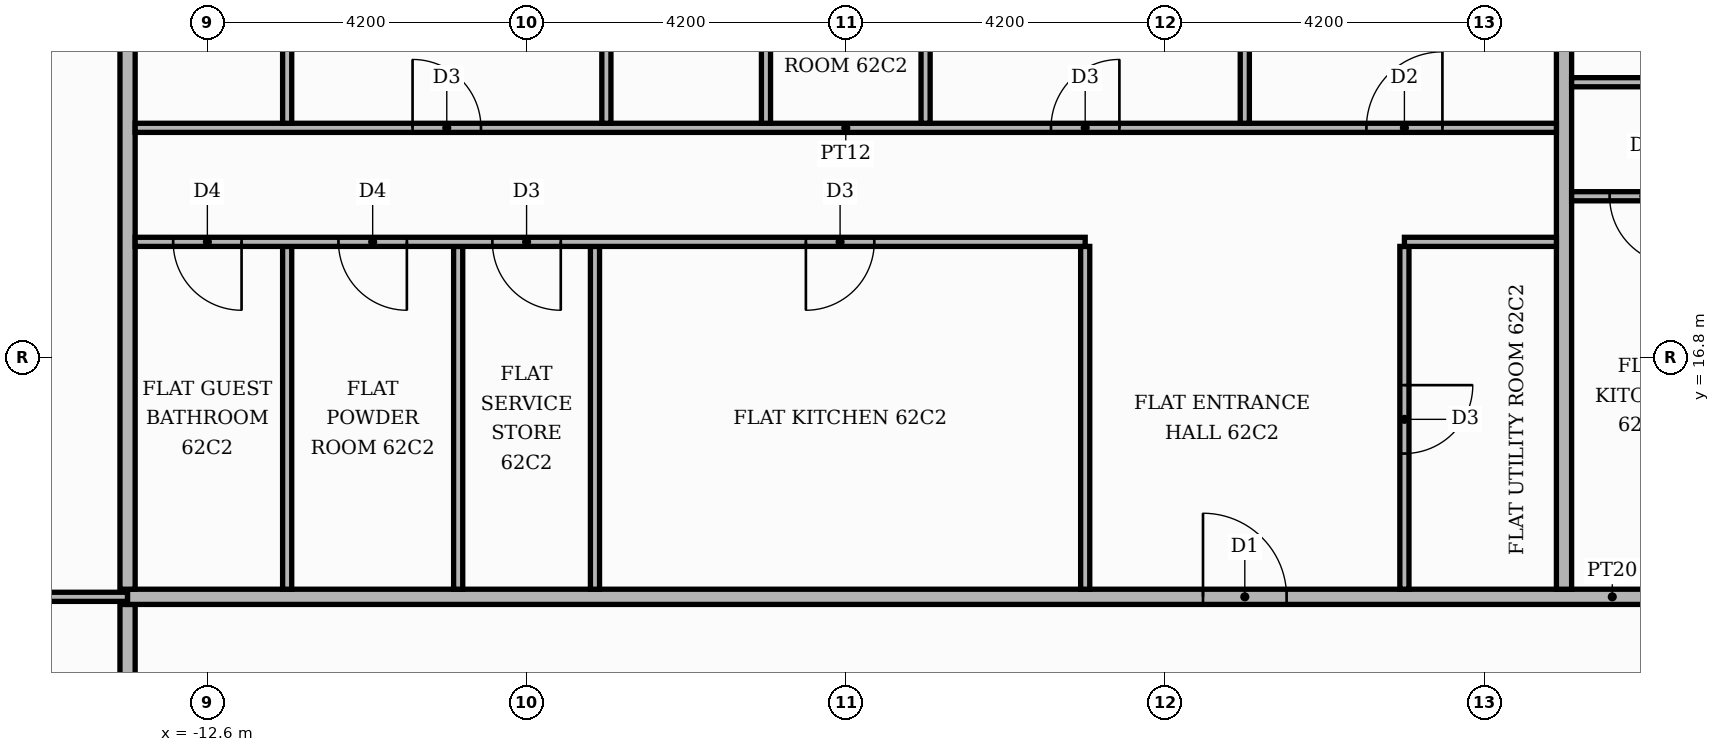
"""IFC4 building model, lengths in metres.
Left out: names, types, materials, properties, quantities, classifications, styles, units other than length and angle.
Written with IfcOpenShell. Run it as: python <this file> out.ifc"""

import sys

from ifc_helpers import new_model, si_unit, direction, frame, frame_2d, origin, place, context, subcontext, project, spatial, rectangle, extrude, element, fill, save


model = new_model("IFC4")
c1 = context("Model", 3, precision=1e-05, world=origin(), true_north=direction((0.0, 1.0)))
c2 = subcontext(c1, "Body", "Model", "MODEL_VIEW")
j1 = project(units=[si_unit("LENGTHUNIT", "METRE"), si_unit("PLANEANGLEUNIT", "RADIAN")], contexts=[c1])
p1 = place(None, origin())
s1 = spatial("IfcSite", under=j1, at=p1, CompositionType="ELEMENT")
p2 = place(p1, origin())
s2 = spatial("IfcBuilding", under=s1, at=p2, CompositionType="ELEMENT")
p3 = place(p2, frame((0.0, 0.0, 260.1)))
s3 = spatial("IfcBuildingStorey", under=s2, at=p3, CompositionType="ELEMENT", Elevation=260.1)
p4 = place(p3, frame((-13.65, 11.1, 0.0), z_axis=(0.0, 0.0, 1.0), x_axis=(0.0, 1.0, 0.0)))
e1 = element("IfcWall", 1, at=p4, inside=s3, PredefinedType="PARTITIONING", context=c2, shape_type="SweptSolid", body=[
    extrude(rectangle(XDim=2.45, YDim=0.2, at=frame_2d((1.225, 0.0))), origin(), (0.0, 0.0, 1.0), 3.48),
])
p5 = place(p3, frame((-20.72, 13.65, 0.0), z_axis=(0.0, 0.0, 1.0), x_axis=(1.0, 0.0, 0.0)))
e2 = element("IfcWall", 2, at=p5, inside=s3, PredefinedType="PARTITIONING", context=c2, shape_type="SweptSolid", body=[
    extrude(rectangle(XDim=7.07, YDim=0.12, at=frame_2d((3.535, 0.0))), origin(), (0.0, 0.0, 1.0), 3.48),
])
p6 = place(p5, frame((3.085, 0.0, 0.0)))
e3 = element("IfcOpeningElement", 3, at=p6, cuts=e2, PredefinedType="OPENING", context=c2, shape_type="SweptSolid", body=[
    extrude(rectangle(XDim=0.9, YDim=2.1, at=frame_2d((0.45, 1.05))), frame((0.0, 0.07, 0.0), z_axis=(0.0, -1.0, 0.0), x_axis=(1.0, 0.0, 0.0)), (0.0, 0.0, 1.0), 0.14),
])
p7 = place(p3, frame((-13.65, 13.65, 0.0), z_axis=(0.0, 0.0, 1.0), x_axis=(1.0, 0.0, 0.0)))
e4 = element("IfcWall", 4, at=p7, inside=s3, PredefinedType="PARTITIONING", context=c2, shape_type="SweptSolid", body=[
    extrude(rectangle(XDim=39.07, YDim=0.2, at=frame_2d((19.535, 0.0))), origin(), (0.0, 0.0, 1.0), 3.48),
])
p8 = place(p7, frame((24.65, 0.0, 0.0)))
e5 = element("IfcOpeningElement", 5, at=p8, cuts=e4, PredefinedType="OPENING", context=c2, shape_type="SweptSolid", body=[
    extrude(rectangle(XDim=1.1, YDim=2.4, at=frame_2d((0.55, 1.2))), frame((0.0, 0.11, 0.0), z_axis=(0.0, -1.0, 0.0), x_axis=(1.0, 0.0, 0.0)), (0.0, 0.0, 1.0), 0.22),
])
p9 = place(p7, frame((14.15, 0.0, 0.0)))
e6 = element("IfcOpeningElement", 6, at=p9, cuts=e4, PredefinedType="OPENING", context=c2, shape_type="SweptSolid", body=[
    extrude(rectangle(XDim=1.1, YDim=2.4, at=frame_2d((0.55, 1.2))), frame((0.0, 0.11, 0.0), z_axis=(0.0, -1.0, 0.0), x_axis=(1.0, 0.0, 0.0)), (0.0, 0.0, 1.0), 0.22),
])
p10 = place(p3, frame((-13.65, 13.75, 0.0), z_axis=(0.0, 0.0, 1.0), x_axis=(0.0, 1.0, 0.0)))
e7 = element("IfcWall", 7, at=p10, inside=s3, PredefinedType="PARTITIONING", context=c2, shape_type="SweptSolid", body=[
    extrude(rectangle(XDim=11.67, YDim=0.2, at=frame_2d((5.835, 0.0))), origin(), (0.0, 0.0, 1.0), 3.48),
])
for number, where, z_axis, x_axis in (
    (8, (-11.55, 13.75, 0.0), (0.0, 0.0, 1.0), (0.0, 1.0, 0.0)),
    (9, (-9.3, 13.75, 0.0), (0.0, 0.0, 1.0), (0.0, 1.0, 0.0)),
    (10, (-7.5, 13.75, 0.0), (0.0, 0.0, 1.0), (0.0, 1.0, 0.0)),
    (11, (-1.05, 13.75, 0.0), (0.0, 0.0, 1.0), (0.0, 1.0, 0.0)),
):
    element("IfcWall", number, at=place(p3, frame(where, z_axis=z_axis, x_axis=x_axis)), inside=s3, PredefinedType="PARTITIONING", context=c2, shape_type="SweptSolid", body=[
        extrude(rectangle(XDim=4.51, YDim=0.12, at=frame_2d((2.255, 0.0))), origin(), (0.0, 0.0, 1.0), 3.48),
    ])
p11 = place(p3, frame((3.15, 13.75, 0.0), z_axis=(0.0, 0.0, 1.0), x_axis=(0.0, 1.0, 0.0)))
e12 = element("IfcWall", 12, at=p11, inside=s3, PredefinedType="PARTITIONING", context=c2, shape_type="SweptSolid", body=[
    extrude(rectangle(XDim=4.51, YDim=0.12, at=frame_2d((2.255, 0.0))), origin(), (0.0, 0.0, 1.0), 3.48),
])
p12 = place(p11, frame((1.785, 0.0, 0.0)))
e13 = element("IfcOpeningElement", 13, at=p12, cuts=e12, PredefinedType="OPENING", context=c2, shape_type="SweptSolid", body=[
    extrude(rectangle(XDim=0.9, YDim=2.1, at=frame_2d((0.45, 1.05))), frame((0.0, 0.07, 0.0), z_axis=(0.0, -1.0, 0.0), x_axis=(1.0, 0.0, 0.0)), (0.0, 0.0, 1.0), 0.14),
])
p13 = place(p3, frame((5.25, 13.75, 0.0), z_axis=(0.0, 0.0, 1.0), x_axis=(0.0, 1.0, 0.0)))
e14 = element("IfcWall", 14, at=p13, inside=s3, PredefinedType="PARTITIONING", context=c2, shape_type="SweptSolid", body=[
    extrude(rectangle(XDim=11.67, YDim=0.2, at=frame_2d((5.835, 0.0))), origin(), (0.0, 0.0, 1.0), 3.48),
])
p14 = place(p3, frame((-13.55, 18.32, 0.0), z_axis=(0.0, 0.0, 1.0), x_axis=(1.0, 0.0, 0.0)))
e15 = element("IfcWall", 15, at=p14, inside=s3, PredefinedType="PARTITIONING", context=c2, shape_type="SweptSolid", body=[
    extrude(rectangle(XDim=12.5, YDim=0.12, at=frame_2d((6.25, 0.0))), origin(), (0.0, 0.0, 1.0), 3.48),
])
p15 = place(p14, frame((8.825, 0.0, 0.0)))
e16 = element("IfcOpeningElement", 16, at=p15, cuts=e15, PredefinedType="OPENING", context=c2, shape_type="SweptSolid", body=[
    extrude(rectangle(XDim=0.9, YDim=2.1, at=frame_2d((0.45, 1.05))), frame((0.0, 0.07, 0.0), z_axis=(0.0, -1.0, 0.0), x_axis=(1.0, 0.0, 0.0)), (0.0, 0.0, 1.0), 0.14),
])
p16 = place(p14, frame((4.7, 0.0, 0.0)))
e17 = element("IfcOpeningElement", 17, at=p16, cuts=e15, PredefinedType="OPENING", context=c2, shape_type="SweptSolid", body=[
    extrude(rectangle(XDim=0.9, YDim=2.1, at=frame_2d((0.45, 1.05))), frame((0.0, 0.07, 0.0), z_axis=(0.0, -1.0, 0.0), x_axis=(1.0, 0.0, 0.0)), (0.0, 0.0, 1.0), 0.14),
])
p17 = place(p14, frame((2.675, 0.0, 0.0)))
e18 = element("IfcOpeningElement", 18, at=p17, cuts=e15, PredefinedType="OPENING", context=c2, shape_type="SweptSolid", body=[
    extrude(rectangle(XDim=0.9, YDim=2.1, at=frame_2d((0.45, 1.05))), frame((0.0, 0.07, 0.0), z_axis=(0.0, -1.0, 0.0), x_axis=(1.0, 0.0, 0.0)), (0.0, 0.0, 1.0), 0.14),
])
p18 = place(p14, frame((0.5, 0.0, 0.0)))
e19 = element("IfcOpeningElement", 19, at=p18, cuts=e15, PredefinedType="OPENING", context=c2, shape_type="SweptSolid", body=[
    extrude(rectangle(XDim=0.9, YDim=2.1, at=frame_2d((0.45, 1.05))), frame((0.0, 0.07, 0.0), z_axis=(0.0, -1.0, 0.0), x_axis=(1.0, 0.0, 0.0)), (0.0, 0.0, 1.0), 0.14),
])
p19 = place(p3, frame((3.15, 18.32, 0.0), z_axis=(0.0, 0.0, 1.0), x_axis=(1.0, 0.0, 0.0)))
e20 = element("IfcWall", 20, at=p19, inside=s3, PredefinedType="PARTITIONING", context=c2, shape_type="SweptSolid", body=[
    extrude(rectangle(XDim=2.0, YDim=0.12, at=frame_2d((1.0, 0.0))), origin(), (0.0, 0.0, 1.0), 3.48),
])
p20 = place(p3, frame((5.35, 18.92, 0.0), z_axis=(0.0, 0.0, 1.0), x_axis=(1.0, 0.0, 0.0)))
e21 = element("IfcWall", 21, at=p20, inside=s3, PredefinedType="PARTITIONING", context=c2, shape_type="SweptSolid", body=[
    extrude(rectangle(XDim=4.1, YDim=0.12, at=frame_2d((2.05, 0.0))), origin(), (0.0, 0.0, 1.0), 3.48),
])
p21 = place(p20, frame((0.5, 0.0, 0.0)))
e22 = element("IfcOpeningElement", 22, at=p21, cuts=e21, PredefinedType="OPENING", context=c2, shape_type="SweptSolid", body=[
    extrude(rectangle(XDim=0.9, YDim=2.1, at=frame_2d((0.45, 1.05))), frame((0.0, 0.07, 0.0), z_axis=(0.0, -1.0, 0.0), x_axis=(1.0, 0.0, 0.0)), (0.0, 0.0, 1.0), 0.14),
])
p22 = place(p3, frame((-13.55, 19.82, 0.0), z_axis=(0.0, 0.0, 1.0), x_axis=(1.0, 0.0, 0.0)))
e23 = element("IfcWall", 23, at=p22, inside=s3, PredefinedType="PARTITIONING", context=c2, shape_type="SweptSolid", body=[
    extrude(rectangle(XDim=18.7, YDim=0.12, at=frame_2d((9.35, 0.0))), origin(), (0.0, 0.0, 1.0), 3.48),
])
p23 = place(p22, frame((16.2, 0.0, 0.0)))
e24 = element("IfcOpeningElement", 24, at=p23, cuts=e23, PredefinedType="OPENING", context=c2, shape_type="SweptSolid", body=[
    extrude(rectangle(XDim=1.0, YDim=2.1, at=frame_2d((0.5, 1.05))), frame((0.0, 0.07, 0.0), z_axis=(0.0, -1.0, 0.0), x_axis=(1.0, 0.0, 0.0)), (0.0, 0.0, 1.0), 0.14),
])
p24 = place(p22, frame((12.05, 0.0, 0.0)))
e25 = element("IfcOpeningElement", 25, at=p24, cuts=e23, PredefinedType="OPENING", context=c2, shape_type="SweptSolid", body=[
    extrude(rectangle(XDim=0.9, YDim=2.1, at=frame_2d((0.45, 1.05))), frame((0.0, 0.07, 0.0), z_axis=(0.0, -1.0, 0.0), x_axis=(1.0, 0.0, 0.0)), (0.0, 0.0, 1.0), 0.14),
])
p25 = place(p22, frame((3.65, 0.0, 0.0)))
e26 = element("IfcOpeningElement", 26, at=p25, cuts=e23, PredefinedType="OPENING", context=c2, shape_type="SweptSolid", body=[
    extrude(rectangle(XDim=0.9, YDim=2.1, at=frame_2d((0.45, 1.05))), frame((0.0, 0.07, 0.0), z_axis=(0.0, -1.0, 0.0), x_axis=(1.0, 0.0, 0.0)), (0.0, 0.0, 1.0), 0.14),
])
p26 = place(p3, frame((-11.55, 19.88, 0.0), z_axis=(0.0, 0.0, 1.0), x_axis=(0.0, 1.0, 0.0)))
e27 = element("IfcWall", 27, at=p26, inside=s3, PredefinedType="PARTITIONING", context=c2, shape_type="SweptSolid", body=[
    extrude(rectangle(XDim=5.54, YDim=0.12, at=frame_2d((2.77, 0.0))), origin(), (0.0, 0.0, 1.0), 3.48),
])
p27 = place(p26, frame((2.44, 0.0, 0.0)))
e28 = element("IfcOpeningElement", 28, at=p27, cuts=e27, PredefinedType="OPENING", context=c2, shape_type="SweptSolid", body=[
    extrude(rectangle(XDim=0.9, YDim=2.1, at=frame_2d((0.45, 1.05))), frame((0.0, 0.07, 0.0), z_axis=(0.0, -1.0, 0.0), x_axis=(1.0, 0.0, 0.0)), (0.0, 0.0, 1.0), 0.14),
])
p28 = place(p3, frame((-7.35, 19.88, 0.0), z_axis=(0.0, 0.0, 1.0), x_axis=(0.0, 1.0, 0.0)))
e29 = element("IfcWall", 29, at=p28, inside=s3, PredefinedType="PARTITIONING", context=c2, shape_type="SweptSolid", body=[
    extrude(rectangle(XDim=5.54, YDim=0.12, at=frame_2d((2.77, 0.0))), origin(), (0.0, 0.0, 1.0), 3.48),
])
p29 = place(p3, frame((-5.25, 19.88, 0.0), z_axis=(0.0, 0.0, 1.0), x_axis=(0.0, 1.0, 0.0)))
e30 = element("IfcWall", 30, at=p29, inside=s3, PredefinedType="PARTITIONING", context=c2, shape_type="SweptSolid", body=[
    extrude(rectangle(XDim=5.54, YDim=0.12, at=frame_2d((2.77, 0.0))), origin(), (0.0, 0.0, 1.0), 3.48),
])
p30 = place(p29, frame((2.44, 0.0, 0.0)))
e31 = element("IfcOpeningElement", 31, at=p30, cuts=e30, PredefinedType="OPENING", context=c2, shape_type="SweptSolid", body=[
    extrude(rectangle(XDim=0.9, YDim=2.1, at=frame_2d((0.45, 1.05))), frame((0.0, 0.07, 0.0), z_axis=(0.0, -1.0, 0.0), x_axis=(1.0, 0.0, 0.0)), (0.0, 0.0, 1.0), 0.14),
])
p31 = place(p3, frame((-3.15, 19.88, 0.0), z_axis=(0.0, 0.0, 1.0), x_axis=(0.0, 1.0, 0.0)))
e32 = element("IfcWall", 32, at=p31, inside=s3, PredefinedType="PARTITIONING", context=c2, shape_type="SweptSolid", body=[
    extrude(rectangle(XDim=5.54, YDim=0.12, at=frame_2d((2.77, 0.0))), origin(), (0.0, 0.0, 1.0), 3.48),
])
p32 = place(p31, frame((2.44, 0.0, 0.0)))
e33 = element("IfcOpeningElement", 33, at=p32, cuts=e32, PredefinedType="OPENING", context=c2, shape_type="SweptSolid", body=[
    extrude(rectangle(XDim=0.9, YDim=2.1, at=frame_2d((0.45, 1.05))), frame((0.0, 0.07, 0.0), z_axis=(0.0, -1.0, 0.0), x_axis=(1.0, 0.0, 0.0)), (0.0, 0.0, 1.0), 0.14),
])
p33 = place(p3, frame((1.05, 19.88, 0.0), z_axis=(0.0, 0.0, 1.0), x_axis=(0.0, 1.0, 0.0)))
e34 = element("IfcWall", 34, at=p33, inside=s3, PredefinedType="PARTITIONING", context=c2, shape_type="SweptSolid", body=[
    extrude(rectangle(XDim=5.54, YDim=0.12, at=frame_2d((2.77, 0.0))), origin(), (0.0, 0.0, 1.0), 3.48),
])
p34 = place(p3, frame((5.35, 20.42, 0.0), z_axis=(0.0, 0.0, 1.0), x_axis=(1.0, 0.0, 0.0)))
e35 = element("IfcWall", 35, at=p34, inside=s3, PredefinedType="PARTITIONING", context=c2, shape_type="SweptSolid", body=[
    extrude(rectangle(XDim=15.369, YDim=0.12, at=frame_2d((7.685, 0.0))), origin(), (0.0, 0.0, 1.0), 3.48),
])
p35 = place(p34, frame((8.85, 0.0, 0.0)))
e36 = element("IfcOpeningElement", 36, at=p35, cuts=e35, PredefinedType="OPENING", context=c2, shape_type="SweptSolid", body=[
    extrude(rectangle(XDim=1.0, YDim=2.1, at=frame_2d((0.5, 1.05))), frame((0.0, 0.07, 0.0), z_axis=(0.0, -1.0, 0.0), x_axis=(1.0, 0.0, 0.0)), (0.0, 0.0, 1.0), 0.14),
])
p36 = place(p34, frame((5.75, 0.0, 0.0)))
e37 = element("IfcOpeningElement", 37, at=p36, cuts=e35, PredefinedType="OPENING", context=c2, shape_type="SweptSolid", body=[
    extrude(rectangle(XDim=0.9, YDim=2.1, at=frame_2d((0.45, 1.05))), frame((0.0, 0.07, 0.0), z_axis=(0.0, -1.0, 0.0), x_axis=(1.0, 0.0, 0.0)), (0.0, 0.0, 1.0), 0.14),
])
p37 = place(p21, frame((0.9, 0.0, 0.0), z_axis=(0.0, 0.0, 1.0), x_axis=(-1.0, 0.0, 0.0)))
e38 = element("IfcDoor", 38, at=p37, inside=s3, OperationType="SINGLE_SWING_RIGHT", PredefinedType="DOOR", context=c2, shape_type="SweptSolid", body=[
    extrude(rectangle(XDim=0.9, YDim=2.1, at=frame_2d((0.45, 1.05))), frame((0.0, 0.025, 0.0), z_axis=(0.0, -1.0, 0.0), x_axis=(1.0, 0.0, 0.0)), (0.0, 0.0, 1.0), 0.05),
])
fill(e22, e38)
p38 = place(p9, origin())
e39 = element("IfcDoor", 39, at=p38, inside=s3, OperationType="SINGLE_SWING_LEFT", PredefinedType="DOOR", context=c2, shape_type="SweptSolid", body=[
    extrude(rectangle(XDim=1.1, YDim=2.4, at=frame_2d((0.55, 1.2))), frame((0.0, 0.025, 0.0), z_axis=(0.0, -1.0, 0.0), x_axis=(1.0, 0.0, 0.0)), (0.0, 0.0, 1.0), 0.05),
])
fill(e6, e39)
p39 = place(p12, frame((0.9, 0.0, 0.0), z_axis=(0.0, 0.0, 1.0), x_axis=(-1.0, 0.0, 0.0)))
e40 = element("IfcDoor", 40, at=p39, inside=s3, OperationType="SINGLE_SWING_RIGHT", PredefinedType="DOOR", context=c2, shape_type="SweptSolid", body=[
    extrude(rectangle(XDim=0.9, YDim=2.1, at=frame_2d((0.45, 1.05))), frame((0.0, 0.025, 0.0), z_axis=(0.0, -1.0, 0.0), x_axis=(1.0, 0.0, 0.0)), (0.0, 0.0, 1.0), 0.05),
])
fill(e13, e40)
p40 = place(p15, frame((0.9, 0.0, 0.0), z_axis=(0.0, 0.0, 1.0), x_axis=(-1.0, 0.0, 0.0)))
e41 = element("IfcDoor", 41, at=p40, inside=s3, OperationType="SINGLE_SWING_LEFT", PredefinedType="DOOR", context=c2, shape_type="SweptSolid", body=[
    extrude(rectangle(XDim=0.9, YDim=2.1, at=frame_2d((0.45, 1.05))), frame((0.0, 0.025, 0.0), z_axis=(0.0, -1.0, 0.0), x_axis=(1.0, 0.0, 0.0)), (0.0, 0.0, 1.0), 0.05),
])
fill(e16, e41)
p41 = place(p16, frame((0.9, 0.0, 0.0), z_axis=(0.0, 0.0, 1.0), x_axis=(-1.0, 0.0, 0.0)))
e42 = element("IfcDoor", 42, at=p41, inside=s3, OperationType="SINGLE_SWING_RIGHT", PredefinedType="DOOR", context=c2, shape_type="SweptSolid", body=[
    extrude(rectangle(XDim=0.9, YDim=2.1, at=frame_2d((0.45, 1.05))), frame((0.0, 0.025, 0.0), z_axis=(0.0, -1.0, 0.0), x_axis=(1.0, 0.0, 0.0)), (0.0, 0.0, 1.0), 0.05),
])
fill(e17, e42)
p42 = place(p17, frame((0.9, 0.0, 0.0), z_axis=(0.0, 0.0, 1.0), x_axis=(-1.0, 0.0, 0.0)))
e43 = element("IfcDoor", 43, at=p42, inside=s3, OperationType="SINGLE_SWING_RIGHT", PredefinedType="DOOR", context=c2, shape_type="SweptSolid", body=[
    extrude(rectangle(XDim=0.9, YDim=2.1, at=frame_2d((0.45, 1.05))), frame((0.0, 0.025, 0.0), z_axis=(0.0, -1.0, 0.0), x_axis=(1.0, 0.0, 0.0)), (0.0, 0.0, 1.0), 0.05),
])
fill(e18, e43)
p43 = place(p18, frame((0.9, 0.0, 0.0), z_axis=(0.0, 0.0, 1.0), x_axis=(-1.0, 0.0, 0.0)))
e44 = element("IfcDoor", 44, at=p43, inside=s3, OperationType="SINGLE_SWING_RIGHT", PredefinedType="DOOR", context=c2, shape_type="SweptSolid", body=[
    extrude(rectangle(XDim=0.9, YDim=2.1, at=frame_2d((0.45, 1.05))), frame((0.0, 0.025, 0.0), z_axis=(0.0, -1.0, 0.0), x_axis=(1.0, 0.0, 0.0)), (0.0, 0.0, 1.0), 0.05),
])
fill(e19, e44)
p44 = place(p23, origin())
e45 = element("IfcDoor", 45, at=p44, inside=s3, OperationType="SINGLE_SWING_RIGHT", PredefinedType="DOOR", context=c2, shape_type="SweptSolid", body=[
    extrude(rectangle(XDim=1.0, YDim=2.1, at=frame_2d((0.5, 1.05))), frame((0.0, 0.025, 0.0), z_axis=(0.0, -1.0, 0.0), x_axis=(1.0, 0.0, 0.0)), (0.0, 0.0, 1.0), 0.05),
])
fill(e24, e45)
p45 = place(p24, origin())
e46 = element("IfcDoor", 46, at=p45, inside=s3, OperationType="SINGLE_SWING_RIGHT", PredefinedType="DOOR", context=c2, shape_type="SweptSolid", body=[
    extrude(rectangle(XDim=0.9, YDim=2.1, at=frame_2d((0.45, 1.05))), frame((0.0, 0.025, 0.0), z_axis=(0.0, -1.0, 0.0), x_axis=(1.0, 0.0, 0.0)), (0.0, 0.0, 1.0), 0.05),
])
fill(e25, e46)
p46 = place(p25, origin())
e47 = element("IfcDoor", 47, at=p46, inside=s3, OperationType="SINGLE_SWING_LEFT", PredefinedType="DOOR", context=c2, shape_type="SweptSolid", body=[
    extrude(rectangle(XDim=0.9, YDim=2.1, at=frame_2d((0.45, 1.05))), frame((0.0, 0.025, 0.0), z_axis=(0.0, -1.0, 0.0), x_axis=(1.0, 0.0, 0.0)), (0.0, 0.0, 1.0), 0.05),
])
fill(e26, e47)
save(model, sys.argv[1])
